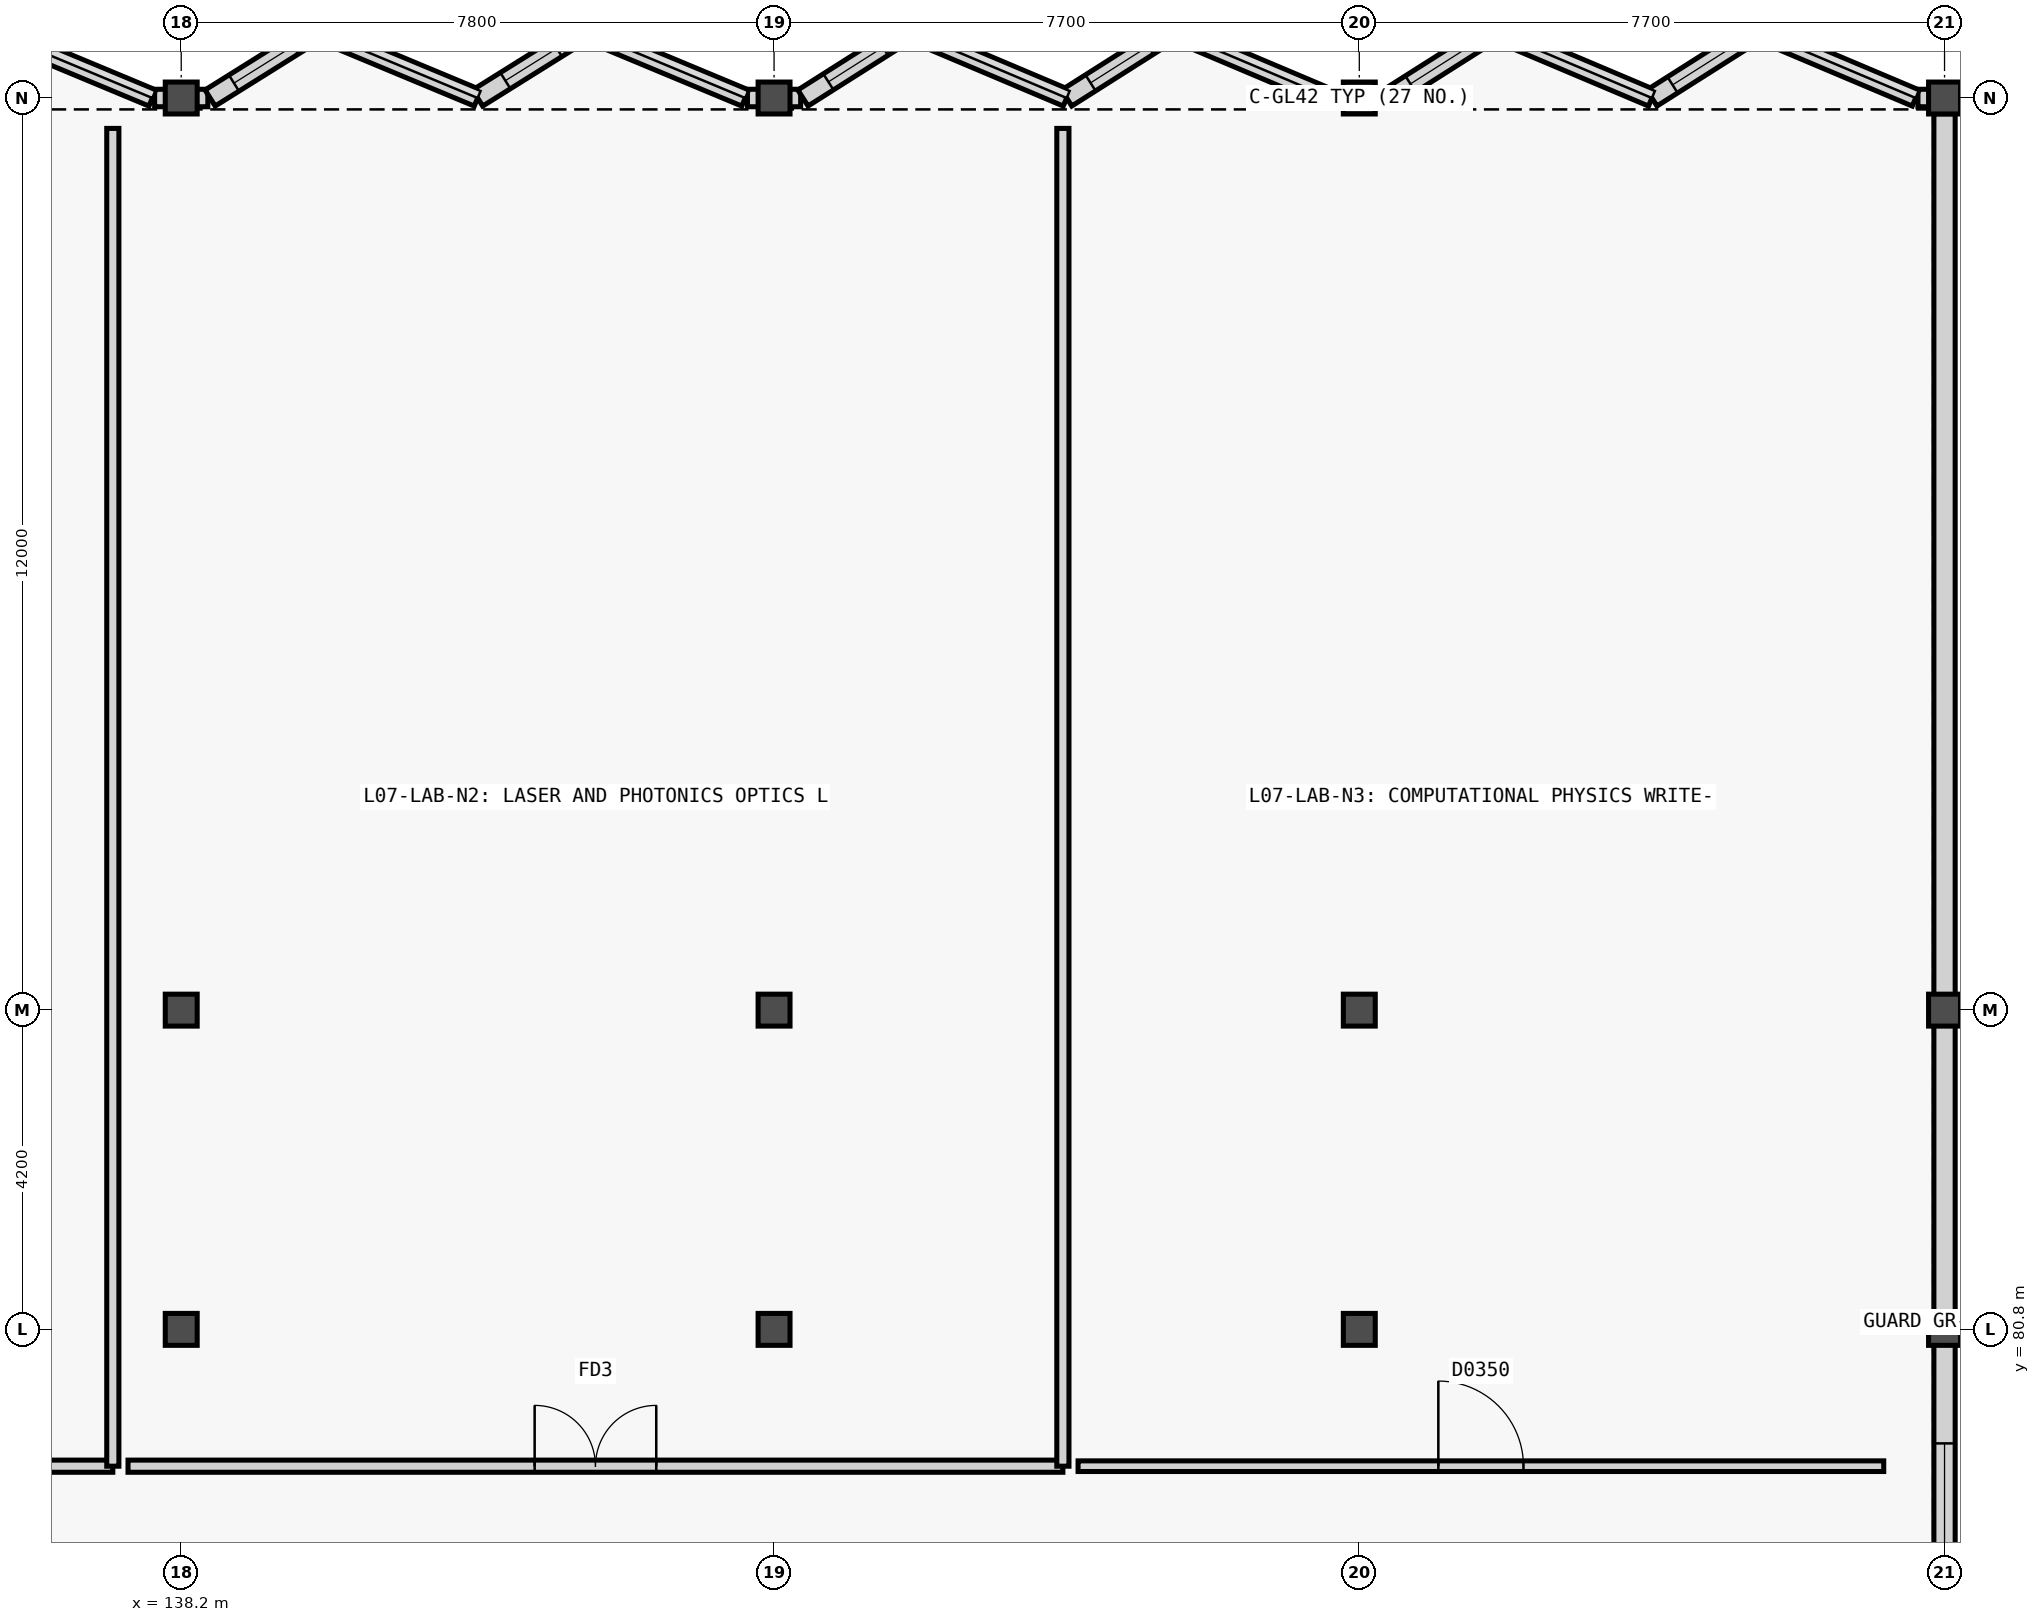
"""IFC4 building model, lengths in metres.
Left out: names, types, materials, properties, quantities, classifications, styles, units other than length and angle.
Written with IfcOpenShell. Run it as: python <this file> out.ifc"""

import sys

from ifc_helpers import new_model, si_unit, direction, frame, frame_2d, origin, origin_2d, place, context, subcontext, project, spatial, rectangle, extrude, element, fill, save


model = new_model("IFC4")
c1 = context("Model", 3, precision=1e-05, world=origin(), true_north=direction((0.0, 1.0)))
c2 = subcontext(c1, "Body", "Model", "MODEL_VIEW")
j1 = project(units=[si_unit("LENGTHUNIT", "METRE"), si_unit("PLANEANGLEUNIT", "RADIAN")], contexts=[c1])
p1 = place(None, origin())
s1 = spatial("IfcSite", under=j1, at=p1, CompositionType="ELEMENT")
p2 = place(p1, origin())
s2 = spatial("IfcBuilding", under=s1, at=p2, CompositionType="ELEMENT")
p3 = place(p2, frame((0.0, 0.0, 28.8)))
s3 = spatial("IfcBuildingStorey", under=s2, at=p3, CompositionType="ELEMENT", Elevation=28.8)
for number, where, z_axis, x_axis in (
    (1, (138.2, 80.8, 0.0), (0.0, 0.0, 1.0), (1.0, 0.0, 0.0)),
    (2, (138.2, 85.0, 0.0), (0.0, 0.0, 1.0), (1.0, 0.0, 0.0)),
    (3, (138.2, 97.0, 0.0), (0.0, 0.0, 1.0), (1.0, 0.0, 0.0)),
    (4, (146.0, 80.8, 0.0), (0.0, 0.0, 1.0), (1.0, 0.0, 0.0)),
    (5, (146.0, 85.0, 0.0), (0.0, 0.0, 1.0), (1.0, 0.0, 0.0)),
    (6, (146.0, 97.0, 0.0), (0.0, 0.0, 1.0), (1.0, 0.0, 0.0)),
    (7, (153.7, 80.8, 0.0), (0.0, 0.0, 1.0), (1.0, 0.0, 0.0)),
    (8, (153.7, 85.0, 0.0), (0.0, 0.0, 1.0), (1.0, 0.0, 0.0)),
    (9, (153.7, 97.0, 0.0), (0.0, 0.0, 1.0), (1.0, 0.0, 0.0)),
    (10, (161.4, 80.8, 0.0), (0.0, 0.0, 1.0), (1.0, 0.0, 0.0)),
    (11, (161.4, 85.0, 0.0), (0.0, 0.0, 1.0), (1.0, 0.0, 0.0)),
    (12, (161.4, 97.0, 0.0), (0.0, 0.0, 1.0), (1.0, 0.0, 0.0)),
):
    element("IfcColumn", number, at=place(p3, frame(where, z_axis=z_axis, x_axis=x_axis)), inside=s3, PredefinedType="COLUMN", context=c2, shape_type="SweptSolid", body=[
        extrude(rectangle(XDim=0.42, YDim=0.42, at=origin_2d()), origin(), (0.0, 0.0, 1.0), 3.6),
    ])
p4 = place(p3, frame((161.4, 96.792, 0.0), z_axis=(0.0, 0.0, 1.0), x_axis=(0.0, -1.0, 0.0)))
e13 = element("IfcWall", 13, at=p4, inside=s3, PredefinedType="SOLIDWALL", context=c2, shape_type="SweptSolid", body=[
    extrude(rectangle(XDim=32.584, YDim=0.28, at=frame_2d((16.292, 0.0))), origin(), (0.0, 0.0, 1.0), 2.78),
])
p5 = place(p4, frame((17.492, 0.0, 0.82)))
e14 = element("IfcOpeningElement", 14, at=p5, cuts=e13, PredefinedType="OPENING", context=c2, shape_type="SweptSolid", body=[
    extrude(rectangle(XDim=4.8, YDim=1.55, at=frame_2d((2.4, 0.775))), frame((0.0, 0.15, 0.0), z_axis=(0.0, -1.0, 0.0), x_axis=(1.0, 0.0, 0.0)), (0.0, 0.0, 1.0), 0.3),
])
p6 = place(p3, frame((137.85, 97.0, 0.0), z_axis=(0.0, 0.0, 1.0), x_axis=(1.0, 0.0, 0.0)))
e15 = element("IfcWall", 15, at=p6, inside=s3, PredefinedType="SOLIDWALL", context=c2, shape_type="SweptSolid", body=[
    extrude(rectangle(XDim=0.35, YDim=0.23, at=frame_2d((0.175, 0.0))), origin(), (0.0, 0.0, 1.0), 3.36),
])
for number, where, z_axis, x_axis in (
    (16, (138.2, 97.0, 0.0), (0.0, 0.0, 1.0), (1.0, 0.0, 0.0)),
    (17, (145.65, 97.0, 0.0), (0.0, 0.0, 1.0), (1.0, 0.0, 0.0)),
    (18, (146.0, 97.0, 0.0), (0.0, 0.0, 1.0), (1.0, 0.0, 0.0)),
):
    element("IfcWall", number, at=place(p3, frame(where, z_axis=z_axis, x_axis=x_axis)), inside=s3, PredefinedType="SOLIDWALL", context=c2, shape_type="SweptSolid", body=[
        extrude(rectangle(XDim=0.35, YDim=0.23, at=frame_2d((0.175, 0.0))), origin(), (0.0, 0.0, 1.0), 3.36),
    ])
p7 = place(p3, frame((153.35, 97.0, 0.0), z_axis=(0.0, 0.0, 1.0), x_axis=(1.0, 0.0, 0.0)))
e19 = element("IfcWall", 19, at=p7, inside=s3, PredefinedType="SOLIDWALL", context=c2, shape_type="SweptSolid", body=[
    extrude(rectangle(XDim=0.35, YDim=0.23, at=frame_2d((0.175, 0.0))), origin(), (0.0, 0.0, 1.0), 3.36),
])
p8 = place(p3, frame((153.7, 97.0, 0.0), z_axis=(0.0, 0.0, 1.0), x_axis=(1.0, 0.0, 0.0)))
e20 = element("IfcWall", 20, at=p8, inside=s3, PredefinedType="SOLIDWALL", context=c2, shape_type="SweptSolid", body=[
    extrude(rectangle(XDim=0.35, YDim=0.23, at=frame_2d((0.175, 0.0))), origin(), (0.0, 0.0, 1.0), 3.36),
])
p9 = place(p3, frame((161.05, 97.0, 0.0), z_axis=(0.0, 0.0, 1.0), x_axis=(1.0, 0.0, 0.0)))
e21 = element("IfcWall", 21, at=p9, inside=s3, PredefinedType="SOLIDWALL", context=c2, shape_type="SweptSolid", body=[
    extrude(rectangle(XDim=0.35, YDim=0.23, at=frame_2d((0.175, 0.0))), origin(), (0.0, 0.0, 1.0), 3.36),
])
p10 = place(p3, frame((135.708, 97.88, 0.0), z_axis=(0.0, 0.0, 1.0), x_axis=(0.92309902008, -0.384562347517, 0.0)))
e22 = element("IfcWall", 22, at=p10, inside=s3, PredefinedType="SOLIDWALL", context=c2, shape_type="SweptSolid", body=[
    extrude(rectangle(XDim=2.288, YDim=0.23, at=frame_2d((1.144, 0.0))), origin(), (0.0, 0.0, 1.0), 3.36),
])
p11 = place(p3, frame((138.58, 97.0, 0.0), z_axis=(0.0, 0.0, 1.0), x_axis=(0.848023086369, 0.529959286158, 0.0)))
e23 = element("IfcWall", 23, at=p11, inside=s3, PredefinedType="SOLIDWALL", context=c2, shape_type="SweptSolid", body=[
    extrude(rectangle(XDim=1.66, YDim=0.25, at=frame_2d((0.83, 0.0))), origin(), (0.0, 0.0, 1.0), 3.36),
])
p12 = place(p11, frame((0.37, 0.0, 0.82)))
e24 = element("IfcOpeningElement", 24, at=p12, cuts=e23, PredefinedType="OPENING", context=c2, shape_type="SweptSolid", body=[
    extrude(rectangle(XDim=0.92, YDim=1.38, at=frame_2d((0.46, 0.69))), frame((0.0, 0.135, 0.0), z_axis=(0.0, -1.0, 0.0), x_axis=(1.0, 0.0, 0.0)), (0.0, 0.0, 1.0), 0.27),
])
p13 = place(p3, frame((139.988, 97.88, 0.0), z_axis=(0.0, 0.0, 1.0), x_axis=(0.92309902008, -0.384562347517, 0.0)))
e25 = element("IfcWall", 25, at=p13, inside=s3, PredefinedType="SOLIDWALL", context=c2, shape_type="SweptSolid", body=[
    extrude(rectangle(XDim=2.288, YDim=0.23, at=frame_2d((1.144, 0.0))), origin(), (0.0, 0.0, 1.0), 3.36),
])
p14 = place(p3, frame((142.1, 97.0, 0.0), z_axis=(0.0, 0.0, 1.0), x_axis=(0.848023086369, 0.529959286158, 0.0)))
e26 = element("IfcWall", 26, at=p14, inside=s3, PredefinedType="SOLIDWALL", context=c2, shape_type="SweptSolid", body=[
    extrude(rectangle(XDim=1.66, YDim=0.25, at=frame_2d((0.83, 0.0))), origin(), (0.0, 0.0, 1.0), 3.36),
])
p15 = place(p14, frame((0.43, 0.0, 0.82)))
e27 = element("IfcOpeningElement", 27, at=p15, cuts=e26, PredefinedType="OPENING", context=c2, shape_type="SweptSolid", body=[
    extrude(rectangle(XDim=0.8, YDim=1.35, at=frame_2d((0.4, 0.675))), frame((0.0, 0.135, 0.0), z_axis=(0.0, -1.0, 0.0), x_axis=(1.0, 0.0, 0.0)), (0.0, 0.0, 1.0), 0.27),
])
p16 = place(p3, frame((143.508, 97.88, 0.0), z_axis=(0.0, 0.0, 1.0), x_axis=(0.92309902008, -0.384562347517, 0.0)))
e28 = element("IfcWall", 28, at=p16, inside=s3, PredefinedType="SOLIDWALL", context=c2, shape_type="SweptSolid", body=[
    extrude(rectangle(XDim=2.288, YDim=0.23, at=frame_2d((1.144, 0.0))), origin(), (0.0, 0.0, 1.0), 3.36),
])
p17 = place(p3, frame((146.38, 97.0, 0.0), z_axis=(0.0, 0.0, 1.0), x_axis=(0.844626536799, 0.535355968805, 0.0)))
e29 = element("IfcWall", 29, at=p17, inside=s3, PredefinedType="SOLIDWALL", context=c2, shape_type="SweptSolid", body=[
    extrude(rectangle(XDim=1.644, YDim=0.25, at=frame_2d((0.822, 0.0))), origin(), (0.0, 0.0, 1.0), 3.36),
])
p18 = place(p17, frame((0.397, 0.0, 0.82)))
e30 = element("IfcOpeningElement", 30, at=p18, cuts=e29, PredefinedType="OPENING", context=c2, shape_type="SweptSolid", body=[
    extrude(rectangle(XDim=0.85, YDim=1.4, at=frame_2d((0.425, 0.7))), frame((0.0, 0.135, 0.0), z_axis=(0.0, -1.0, 0.0), x_axis=(1.0, 0.0, 0.0)), (0.0, 0.0, 1.0), 0.27),
])
p19 = place(p3, frame((147.768, 97.88, 0.0), z_axis=(0.0, 0.0, 1.0), x_axis=(0.921122216024, -0.389273506866, 0.0)))
e31 = element("IfcWall", 31, at=p19, inside=s3, PredefinedType="SOLIDWALL", context=c2, shape_type="SweptSolid", body=[
    extrude(rectangle(XDim=2.26, YDim=0.23, at=frame_2d((1.13, 0.0))), origin(), (0.0, 0.0, 1.0), 3.36),
])
p20 = place(p3, frame((149.85, 97.0, 0.0), z_axis=(0.0, 0.0, 1.0), x_axis=(0.844583954912, 0.535423143976, 0.0)))
e32 = element("IfcWall", 32, at=p20, inside=s3, PredefinedType="SOLIDWALL", context=c2, shape_type="SweptSolid", body=[
    extrude(rectangle(XDim=1.643, YDim=0.25, at=frame_2d((0.822, 0.0))), origin(), (0.0, 0.0, 1.0), 3.36),
])
p21 = place(p20, frame((0.372, 0.0, 0.82)))
e33 = element("IfcOpeningElement", 33, at=p21, cuts=e32, PredefinedType="OPENING", context=c2, shape_type="SweptSolid", body=[
    extrude(rectangle(XDim=0.9, YDim=1.45, at=frame_2d((0.45, 0.725))), frame((0.0, 0.135, 0.0), z_axis=(0.0, -1.0, 0.0), x_axis=(1.0, 0.0, 0.0)), (0.0, 0.0, 1.0), 0.27),
])
p22 = place(p3, frame((151.238, 97.88, 0.0), z_axis=(0.0, 0.0, 1.0), x_axis=(0.921122216024, -0.389273506866, 0.0)))
e34 = element("IfcWall", 34, at=p22, inside=s3, PredefinedType="SOLIDWALL", context=c2, shape_type="SweptSolid", body=[
    extrude(rectangle(XDim=2.26, YDim=0.23, at=frame_2d((1.13, 0.0))), origin(), (0.0, 0.0, 1.0), 3.36),
])
p23 = place(p3, frame((154.08, 97.0, 0.0), z_axis=(0.0, 0.0, 1.0), x_axis=(0.844583954912, 0.535423143976, 0.0)))
e35 = element("IfcWall", 35, at=p23, inside=s3, PredefinedType="SOLIDWALL", context=c2, shape_type="SweptSolid", body=[
    extrude(rectangle(XDim=1.643, YDim=0.25, at=frame_2d((0.822, 0.0))), origin(), (0.0, 0.0, 1.0), 3.36),
])
p24 = place(p23, frame((0.347, 0.0, 0.82)))
e36 = element("IfcOpeningElement", 36, at=p24, cuts=e35, PredefinedType="OPENING", context=c2, shape_type="SweptSolid", body=[
    extrude(rectangle(XDim=0.95, YDim=1.5, at=frame_2d((0.475, 0.75))), frame((0.0, 0.135, 0.0), z_axis=(0.0, -1.0, 0.0), x_axis=(1.0, 0.0, 0.0)), (0.0, 0.0, 1.0), 0.27),
])
p25 = place(p3, frame((155.468, 97.88, 0.0), z_axis=(0.0, 0.0, 1.0), x_axis=(0.921122216024, -0.389273506866, 0.0)))
e37 = element("IfcWall", 37, at=p25, inside=s3, PredefinedType="SOLIDWALL", context=c2, shape_type="SweptSolid", body=[
    extrude(rectangle(XDim=2.26, YDim=0.23, at=frame_2d((1.13, 0.0))), origin(), (0.0, 0.0, 1.0), 3.36),
])
p26 = place(p3, frame((157.55, 97.0, 0.0), z_axis=(0.0, 0.0, 1.0), x_axis=(0.844583954912, 0.535423143976, 0.0)))
e38 = element("IfcWall", 38, at=p26, inside=s3, PredefinedType="SOLIDWALL", context=c2, shape_type="SweptSolid", body=[
    extrude(rectangle(XDim=1.643, YDim=0.25, at=frame_2d((0.822, 0.0))), origin(), (0.0, 0.0, 1.0), 3.36),
])
p27 = place(p26, frame((0.322, 0.0, 0.82)))
e39 = element("IfcOpeningElement", 39, at=p27, cuts=e38, PredefinedType="OPENING", context=c2, shape_type="SweptSolid", body=[
    extrude(rectangle(XDim=1.0, YDim=1.35, at=frame_2d((0.5, 0.675))), frame((0.0, 0.135, 0.0), z_axis=(0.0, -1.0, 0.0), x_axis=(1.0, 0.0, 0.0)), (0.0, 0.0, 1.0), 0.27),
])
p28 = place(p3, frame((158.938, 97.88, 0.0), z_axis=(0.0, 0.0, 1.0), x_axis=(0.921122216024, -0.389273506866, 0.0)))
e40 = element("IfcWall", 40, at=p28, inside=s3, PredefinedType="SOLIDWALL", context=c2, shape_type="SweptSolid", body=[
    extrude(rectangle(XDim=2.26, YDim=0.23, at=frame_2d((1.13, 0.0))), origin(), (0.0, 0.0, 1.0), 3.36),
])
p29 = place(p3, frame((122.8, 79.0, 0.0), z_axis=(0.0, 0.0, 1.0), x_axis=(1.0, 0.0, 0.0)))
e41 = element("IfcWall", 41, at=p29, inside=s3, PredefinedType="PARTITIONING", context=c2, shape_type="SweptSolid", body=[
    extrude(rectangle(XDim=14.5, YDim=0.16, at=frame_2d((7.25, 0.0))), origin(), (0.0, 0.0, 1.0), 3.34),
])
p30 = place(p29, frame((6.45, 0.0, 0.0)))
e42 = element("IfcOpeningElement", 42, at=p30, cuts=e41, PredefinedType="OPENING", context=c2, shape_type="SweptSolid", body=[
    extrude(rectangle(XDim=1.6, YDim=2.2, at=frame_2d((0.8, 1.1))), frame((0.0, 0.09, 0.0), z_axis=(0.0, -1.0, 0.0), x_axis=(1.0, 0.0, 0.0)), (0.0, 0.0, 1.0), 0.18),
])
p31 = place(p3, frame((137.3, 79.0, 0.0), z_axis=(0.0, 0.0, 1.0), x_axis=(0.0, 1.0, 0.0)))
e43 = element("IfcWall", 43, at=p31, inside=s3, PredefinedType="PARTITIONING", context=c2, shape_type="SweptSolid", body=[
    extrude(rectangle(XDim=17.6, YDim=0.16, at=frame_2d((8.8, 0.0))), origin(), (0.0, 0.0, 1.0), 3.34),
])
p32 = place(p3, frame((137.5, 79.0, 0.0), z_axis=(0.0, 0.0, 1.0), x_axis=(1.0, 0.0, 0.0)))
e44 = element("IfcWall", 44, at=p32, inside=s3, PredefinedType="PARTITIONING", context=c2, shape_type="SweptSolid", body=[
    extrude(rectangle(XDim=12.3, YDim=0.16, at=frame_2d((6.15, 0.0))), origin(), (0.0, 0.0, 1.0), 3.34),
])
p33 = place(p32, frame((5.35, 0.0, 0.0)))
e45 = element("IfcOpeningElement", 45, at=p33, cuts=e44, PredefinedType="OPENING", context=c2, shape_type="SweptSolid", body=[
    extrude(rectangle(XDim=1.6, YDim=2.2, at=frame_2d((0.8, 1.1))), frame((0.0, 0.09, 0.0), z_axis=(0.0, -1.0, 0.0), x_axis=(1.0, 0.0, 0.0)), (0.0, 0.0, 1.0), 0.18),
])
p34 = place(p3, frame((149.8, 79.0, 0.0), z_axis=(0.0, 0.0, 1.0), x_axis=(0.0, 1.0, 0.0)))
e46 = element("IfcWall", 46, at=p34, inside=s3, PredefinedType="PARTITIONING", context=c2, shape_type="SweptSolid", body=[
    extrude(rectangle(XDim=17.6, YDim=0.16, at=frame_2d((8.8, 0.0))), origin(), (0.0, 0.0, 1.0), 2.9),
])
p35 = place(p3, frame((150.0, 79.0, 0.0), z_axis=(0.0, 0.0, 1.0), x_axis=(1.0, 0.0, 0.0)))
e47 = element("IfcWall", 47, at=p35, inside=s3, PredefinedType="PARTITIONING", context=c2, shape_type="SweptSolid", body=[
    extrude(rectangle(XDim=10.6, YDim=0.14, at=frame_2d((5.3, 0.0))), origin(), (0.0, 0.0, 1.0), 3.34),
])
p36 = place(p35, frame((4.74, 0.0, 0.0)))
e48 = element("IfcOpeningElement", 48, at=p36, cuts=e47, PredefinedType="OPENING", context=c2, shape_type="SweptSolid", body=[
    extrude(rectangle(XDim=1.12, YDim=2.15, at=frame_2d((0.56, 1.075))), frame((0.0, 0.08, 0.0), z_axis=(0.0, -1.0, 0.0), x_axis=(1.0, 0.0, 0.0)), (0.0, 0.0, 1.0), 0.16),
])
p37 = place(p5, origin())
e49 = element("IfcWindow", 49, at=p37, inside=s3, PartitioningType="SINGLE_PANEL", PredefinedType="WINDOW", context=c2, shape_type="SweptSolid", body=[
    extrude(rectangle(XDim=4.8, YDim=1.55, at=frame_2d((2.4, 0.775))), frame((0.0, 0.03, 0.0), z_axis=(0.0, -1.0, 0.0), x_axis=(1.0, 0.0, 0.0)), (0.0, 0.0, 1.0), 0.06),
])
fill(e14, e49)
p38 = place(p12, origin())
e50 = element("IfcWindow", 50, at=p38, inside=s3, PartitioningType="SINGLE_PANEL", PredefinedType="WINDOW", context=c2, shape_type="SweptSolid", body=[
    extrude(rectangle(XDim=0.92, YDim=1.38, at=frame_2d((0.46, 0.69))), frame((0.0, 0.03, 0.0), z_axis=(0.0, -1.0, 0.0), x_axis=(1.0, 0.0, 0.0)), (0.0, 0.0, 1.0), 0.06),
])
fill(e24, e50)
p39 = place(p15, origin())
e51 = element("IfcWindow", 51, at=p39, inside=s3, PartitioningType="SINGLE_PANEL", PredefinedType="WINDOW", context=c2, shape_type="SweptSolid", body=[
    extrude(rectangle(XDim=0.8, YDim=1.35, at=frame_2d((0.4, 0.675))), frame((0.0, 0.03, 0.0), z_axis=(0.0, -1.0, 0.0), x_axis=(1.0, 0.0, 0.0)), (0.0, 0.0, 1.0), 0.06),
])
fill(e27, e51)
p40 = place(p18, origin())
e52 = element("IfcWindow", 52, at=p40, inside=s3, PartitioningType="SINGLE_PANEL", PredefinedType="WINDOW", context=c2, shape_type="SweptSolid", body=[
    extrude(rectangle(XDim=0.85, YDim=1.4, at=frame_2d((0.425, 0.7))), frame((0.0, 0.03, 0.0), z_axis=(0.0, -1.0, 0.0), x_axis=(1.0, 0.0, 0.0)), (0.0, 0.0, 1.0), 0.06),
])
fill(e30, e52)
p41 = place(p21, origin())
e53 = element("IfcWindow", 53, at=p41, inside=s3, PartitioningType="SINGLE_PANEL", PredefinedType="WINDOW", context=c2, shape_type="SweptSolid", body=[
    extrude(rectangle(XDim=0.9, YDim=1.45, at=frame_2d((0.45, 0.725))), frame((0.0, 0.03, 0.0), z_axis=(0.0, -1.0, 0.0), x_axis=(1.0, 0.0, 0.0)), (0.0, 0.0, 1.0), 0.06),
])
fill(e33, e53)
p42 = place(p24, origin())
e54 = element("IfcWindow", 54, at=p42, inside=s3, PartitioningType="SINGLE_PANEL", PredefinedType="WINDOW", context=c2, shape_type="SweptSolid", body=[
    extrude(rectangle(XDim=0.95, YDim=1.5, at=frame_2d((0.475, 0.75))), frame((0.0, 0.03, 0.0), z_axis=(0.0, -1.0, 0.0), x_axis=(1.0, 0.0, 0.0)), (0.0, 0.0, 1.0), 0.06),
])
fill(e36, e54)
p43 = place(p27, origin())
e55 = element("IfcWindow", 55, at=p43, inside=s3, PartitioningType="SINGLE_PANEL", PredefinedType="WINDOW", context=c2, shape_type="SweptSolid", body=[
    extrude(rectangle(XDim=1.0, YDim=1.35, at=frame_2d((0.5, 0.675))), frame((0.0, 0.03, 0.0), z_axis=(0.0, -1.0, 0.0), x_axis=(1.0, 0.0, 0.0)), (0.0, 0.0, 1.0), 0.06),
])
fill(e39, e55)
p44 = place(p33, origin())
e56 = element("IfcDoor", 56, at=p44, inside=s3, OperationType="DOUBLE_DOOR_SINGLE_SWING", PredefinedType="DOOR", context=c2, shape_type="SweptSolid", body=[
    extrude(rectangle(XDim=1.6, YDim=2.2, at=frame_2d((0.8, 1.1))), frame((0.0, 0.025, 0.0), z_axis=(0.0, -1.0, 0.0), x_axis=(1.0, 0.0, 0.0)), (0.0, 0.0, 1.0), 0.05),
])
fill(e45, e56)
p45 = place(p36, origin())
e57 = element("IfcDoor", 57, at=p45, inside=s3, OperationType="SINGLE_SWING_LEFT", PredefinedType="DOOR", context=c2, shape_type="SweptSolid", body=[
    extrude(rectangle(XDim=1.12, YDim=2.15, at=frame_2d((0.56, 1.075))), frame((0.0, 0.025, 0.0), z_axis=(0.0, -1.0, 0.0), x_axis=(1.0, 0.0, 0.0)), (0.0, 0.0, 1.0), 0.05),
])
fill(e48, e57)
save(model, sys.argv[1])
